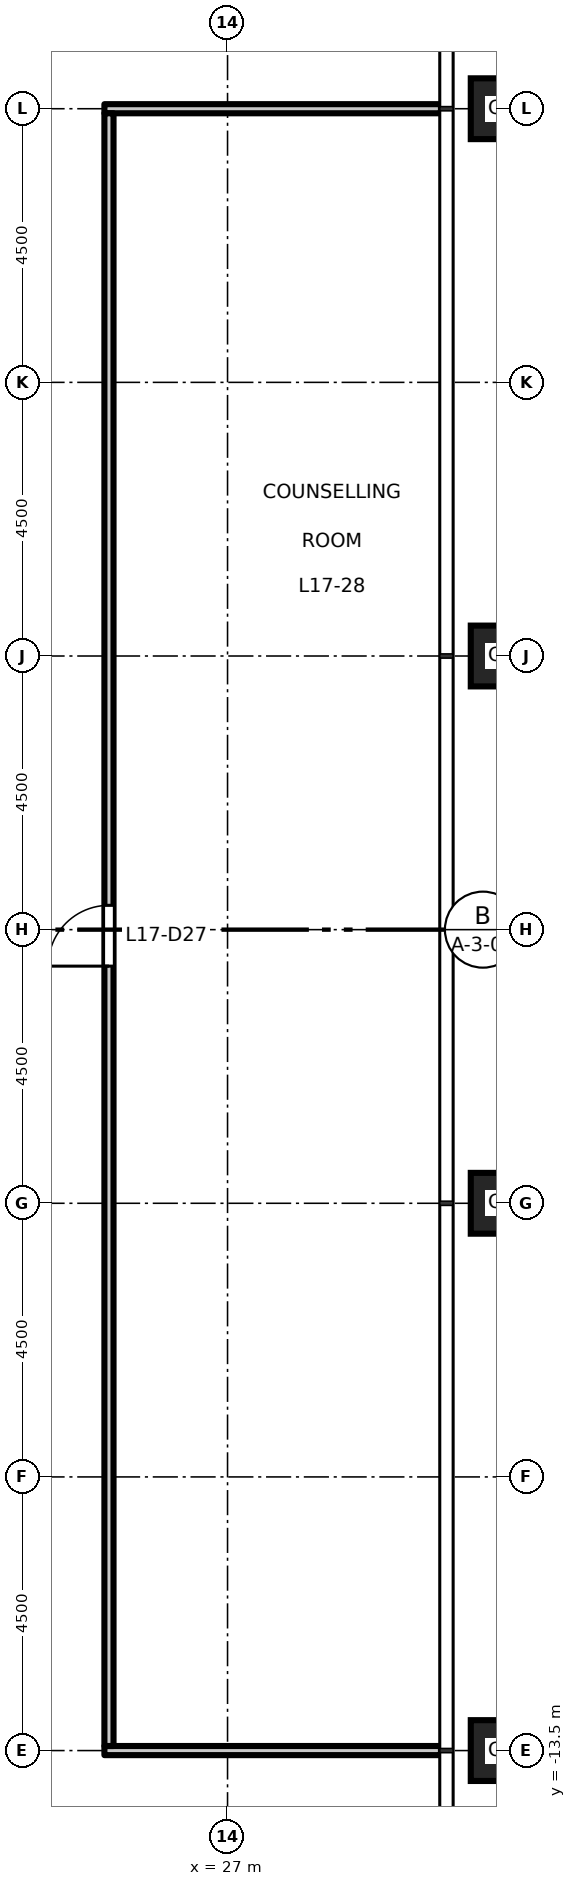
"""IFC4 building model, lengths in metres.
Left out: names, types, materials, properties, quantities, classifications, styles, units other than length and angle.
Written with IfcOpenShell. Run it as: python <this file> out.ifc"""

import sys

from ifc_helpers import new_model, si_unit, direction, frame, frame_2d, origin, origin_2d, place, context, subcontext, project, spatial, rectangle, hollow_rectangle, extrude, element, fill, save


model = new_model("IFC4")
c1 = context("Model", 3, precision=1e-05, world=origin(), true_north=direction((0.0, 1.0)))
c2 = subcontext(c1, "Body", "Model", "MODEL_VIEW")
j1 = project(units=[si_unit("LENGTHUNIT", "METRE"), si_unit("PLANEANGLEUNIT", "RADIAN")], contexts=[c1])
p1 = place(None, origin())
s1 = spatial("IfcSite", under=j1, at=p1, CompositionType="ELEMENT")
p2 = place(p1, origin())
s2 = spatial("IfcBuilding", under=s1, at=p2, CompositionType="ELEMENT")
p3 = place(p2, frame((0.0, 0.0, 80.7)))
s3 = spatial("IfcBuildingStorey", under=s2, at=p3, CompositionType="ELEMENT", Elevation=80.7)
for number, where, z_axis, x_axis in (
    (1, (31.5, -13.5, 0.0), (0.0, 0.0, 1.0), (1.0, 0.0, 0.0)),
    (2, (31.5, -4.5, 0.0), (0.0, 0.0, 1.0), (1.0, 0.0, 0.0)),
    (3, (31.5, 4.5, 0.0), (0.0, 0.0, 1.0), (1.0, 0.0, 0.0)),
    (4, (31.5, 13.5, 0.0), (0.0, 0.0, 1.0), (1.0, 0.0, 0.0)),
):
    element("IfcColumn", number, at=place(p3, frame(where, z_axis=z_axis, x_axis=x_axis)), inside=s3, PredefinedType="COLUMN", context=c2, shape_type="SweptSolid", body=[
        extrude(hollow_rectangle(XDim=1.0, YDim=1.0, WallThickness=0.06, at=origin_2d()), origin(), (0.0, 0.0, 1.0), 4.5),
    ])
for number, where, z_axis, x_axis in (
    (5, (24.975, -13.5, 0.0), (0.0, 0.0, 1.0), (1.0, 0.0, 0.0)),
    (6, (24.975, 13.5, 0.0), (0.0, 0.0, 1.0), (1.0, 0.0, 0.0)),
):
    element("IfcWall", number, at=place(p3, frame(where, z_axis=z_axis, x_axis=x_axis)), inside=s3, PredefinedType="PARTITIONING", context=c2, shape_type="SweptSolid", body=[
        extrude(rectangle(XDim=5.535, YDim=0.15, at=frame_2d((2.768, 0.0))), origin(), (0.0, 0.0, 1.0), 3.35),
    ])
p4 = place(p3, frame((25.05, -13.425, 0.0), z_axis=(0.0, 0.0, 1.0), x_axis=(0.0, 1.0, 0.0)))
e7 = element("IfcWall", 7, at=p4, inside=s3, PredefinedType="PARTITIONING", context=c2, shape_type="SweptSolid", body=[
    extrude(rectangle(XDim=26.85, YDim=0.15, at=frame_2d((13.425, 0.0))), origin(), (0.0, 0.0, 1.0), 4.35),
])
p5 = place(p4, frame((12.825, 0.0, 0.0)))
e8 = element("IfcOpeningElement", 8, at=p5, cuts=e7, PredefinedType="OPENING", context=c2, shape_type="SweptSolid", body=[
    extrude(rectangle(XDim=1.0, YDim=2.1, at=frame_2d((0.5, 1.05))), frame((0.0, 0.085, 0.0), z_axis=(0.0, -1.0, 0.0), x_axis=(1.0, 0.0, 0.0)), (0.0, 0.0, 1.0), 0.17),
])
p6 = place(p5, origin())
e9 = element("IfcDoor", 9, at=p6, inside=s3, OperationType="SINGLE_SWING_LEFT", PredefinedType="DOOR", context=c2, shape_type="SweptSolid", body=[
    extrude(rectangle(XDim=1.0, YDim=2.1, at=frame_2d((0.5, 1.05))), frame((0.0, 0.025, 0.0), z_axis=(0.0, -1.0, 0.0), x_axis=(1.0, 0.0, 0.0)), (0.0, 0.0, 1.0), 0.05),
])
fill(e8, e9)
save(model, sys.argv[1])
